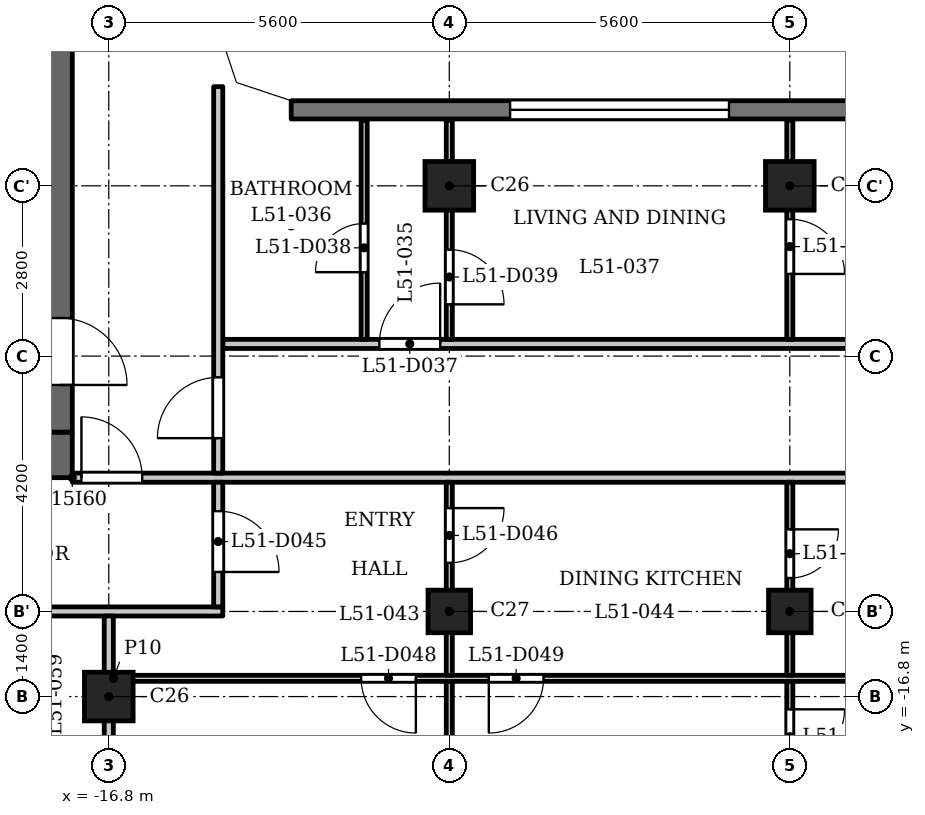
"""IFC4 building model, lengths in metres.
Left out: names, types, materials, properties, quantities, classifications, styles, units other than length and angle.
Written with IfcOpenShell. Run it as: python <this file> out.ifc"""

import sys

from ifc_helpers import new_model, si_unit, direction, frame, frame_2d, origin, origin_2d, place, context, subcontext, project, spatial, polyline, rectangle, outline, extrude, element, fill, save


model = new_model("IFC4")
c1 = context("Model", 3, precision=1e-05, world=origin(), true_north=direction((0.0, 1.0)))
c2 = subcontext(c1, "Body", "Model", "MODEL_VIEW")
j1 = project(units=[si_unit("LENGTHUNIT", "METRE"), si_unit("PLANEANGLEUNIT", "RADIAN")], contexts=[c1])
p1 = place(None, origin())
s1 = spatial("IfcSite", under=j1, at=p1, CompositionType="ELEMENT")
p2 = place(p1, origin())
s2 = spatial("IfcBuilding", under=s1, at=p2, CompositionType="ELEMENT")
p3 = place(p2, frame((0.0, 0.0, 199.4)))
s3 = spatial("IfcBuildingStorey", under=s2, at=p3, CompositionType="ELEMENT", Elevation=199.4)
for number, where, z_axis, x_axis in (
    (1, (-16.8, -16.8, 0.0), (0.0, 0.0, 1.0), (1.0, 0.0, 0.0)),
    (2, (-11.2, -8.4, 0.0), (0.0, 0.0, 1.0), (1.0, 0.0, 0.0)),
    (3, (-5.6, -8.4, 0.0), (0.0, 0.0, 1.0), (1.0, 0.0, 0.0)),
):
    element("IfcColumn", number, at=place(p3, frame(where, z_axis=z_axis, x_axis=x_axis)), inside=s3, PredefinedType="COLUMN", context=c2, shape_type="SweptSolid", body=[
        extrude(rectangle(XDim=0.8, YDim=0.8, at=origin_2d()), origin(), (0.0, 0.0, 1.0), 3.5),
    ])
for number, where, z_axis, x_axis in (
    (4, (-11.2, -15.4, 0.0), (0.0, 0.0, 1.0), (1.0, 0.0, 0.0)),
    (5, (-5.6, -15.4, 0.0), (0.0, 0.0, 1.0), (1.0, 0.0, 0.0)),
):
    element("IfcColumn", number, at=place(p3, frame(where, z_axis=z_axis, x_axis=x_axis)), inside=s3, PredefinedType="COLUMN", context=c2, shape_type="SweptSolid", body=[
        extrude(rectangle(XDim=0.7, YDim=0.7, at=origin_2d()), origin(), (0.0, 0.0, 1.0), 3.5),
    ])
p4 = place(p3, frame((13.8, -7.15, 0.0), z_axis=(0.0, 0.0, 1.0), x_axis=(-1.0, 0.0, 0.0)))
e6 = element("IfcWall", 6, at=p4, inside=s3, PredefinedType="SOLIDWALL", context=c2, shape_type="SweptSolid", body=[
    extrude(rectangle(XDim=27.6, YDim=0.3, at=frame_2d((13.8, 0.0))), origin(), (0.0, 0.0, 1.0), 3.2),
])
p5 = place(p4, frame((3.6, 0.0, 1.2)))
e7 = element("IfcOpeningElement", 7, at=p5, cuts=e6, PredefinedType="OPENING", context=c2, shape_type="SweptSolid", body=[
    extrude(rectangle(XDim=3.6, YDim=0.95, at=frame_2d((1.8, 0.475))), frame((0.0, 0.16, 0.0), z_axis=(0.0, -1.0, 0.0), x_axis=(1.0, 0.0, 0.0)), (0.0, 0.0, 1.0), 0.32),
])
p6 = place(p4, frame((9.2, 0.0, 1.2)))
e8 = element("IfcOpeningElement", 8, at=p6, cuts=e6, PredefinedType="OPENING", context=c2, shape_type="SweptSolid", body=[
    extrude(rectangle(XDim=3.6, YDim=0.95, at=frame_2d((1.8, 0.475))), frame((0.0, 0.16, 0.0), z_axis=(0.0, -1.0, 0.0), x_axis=(1.0, 0.0, 0.0)), (0.0, 0.0, 1.0), 0.32),
])
p7 = place(p4, frame((14.8, 0.0, 1.2)))
e9 = element("IfcOpeningElement", 9, at=p7, cuts=e6, PredefinedType="OPENING", context=c2, shape_type="SweptSolid", body=[
    extrude(rectangle(XDim=3.6, YDim=0.95, at=frame_2d((1.8, 0.475))), frame((0.0, 0.16, 0.0), z_axis=(0.0, -1.0, 0.0), x_axis=(1.0, 0.0, 0.0)), (0.0, 0.0, 1.0), 0.32),
])
p8 = place(p4, frame((20.4, 0.0, 1.2)))
e10 = element("IfcOpeningElement", 10, at=p8, cuts=e6, PredefinedType="OPENING", context=c2, shape_type="SweptSolid", body=[
    extrude(rectangle(XDim=3.6, YDim=0.95, at=frame_2d((1.8, 0.475))), frame((0.0, 0.16, 0.0), z_axis=(0.0, -1.0, 0.0), x_axis=(1.0, 0.0, 0.0)), (0.0, 0.0, 1.0), 0.32),
])
p9 = place(p3, frame((-17.4, -12.825, 0.0), z_axis=(0.0, 0.0, 1.0), x_axis=(-1.0, 0.0, 0.0)))
e11 = element("IfcWall", 11, at=p9, inside=s3, PredefinedType="SHEAR", context=c2, shape_type="SweptSolid", body=[
    extrude(rectangle(XDim=7.6, YDim=0.75, at=frame_2d((3.8, 0.0))), origin(), (0.0, 0.0, 1.0), 3.2),
])
p10 = place(p3, frame((-17.6, -12.45, 0.0), z_axis=(0.0, 0.0, 1.0), x_axis=(0.0, 1.0, 0.0)))
e12 = element("IfcWall", 12, at=p10, inside=s3, PredefinedType="SHEAR", context=c2, shape_type="SweptSolid", body=[
    extrude(rectangle(XDim=24.9, YDim=0.4, at=frame_2d((12.45, 0.0))), origin(), (0.0, 0.0, 1.0), 3.2),
])
p11 = place(p10, frame((8.65, 0.0, 0.0)))
e13 = element("IfcOpeningElement", 13, at=p11, cuts=e12, PredefinedType="OPENING", context=c2, shape_type="SweptSolid", body=[
    extrude(rectangle(XDim=0.9, YDim=2.1, at=frame_2d((0.45, 1.05))), frame((0.0, 0.21, 0.0), z_axis=(0.0, -1.0, 0.0), x_axis=(1.0, 0.0, 0.0)), (0.0, 0.0, 1.0), 0.42),
])
p12 = place(p10, frame((15.6, 0.0, 0.0)))
e14 = element("IfcOpeningElement", 14, at=p12, cuts=e12, PredefinedType="OPENING", context=c2, shape_type="SweptSolid", body=[
    extrude(rectangle(XDim=1.1, YDim=2.1, at=frame_2d((0.55, 1.05))), frame((0.0, 0.21, 0.0), z_axis=(0.0, -1.0, 0.0), x_axis=(1.0, 0.0, 0.0)), (0.0, 0.0, 1.0), 0.42),
])
p13 = place(p10, frame((18.0, 0.0, 0.0)))
e15 = element("IfcOpeningElement", 15, at=p13, cuts=e12, PredefinedType="OPENING", context=c2, shape_type="SweptSolid", body=[
    extrude(rectangle(XDim=1.1, YDim=2.1, at=frame_2d((0.55, 1.05))), frame((0.0, 0.21, 0.0), z_axis=(0.0, -1.0, 0.0), x_axis=(1.0, 0.0, 0.0)), (0.0, 0.0, 1.0), 0.42),
])
p14 = place(p10, frame((23.025, 0.0, 0.0)))
e16 = element("IfcOpeningElement", 16, at=p14, cuts=e12, PredefinedType="OPENING", context=c2, shape_type="SweptSolid", body=[
    extrude(rectangle(XDim=1.1, YDim=2.1, at=frame_2d((0.55, 1.05))), frame((0.0, 0.21, 0.0), z_axis=(0.0, -1.0, 0.0), x_axis=(1.0, 0.0, 0.0)), (0.0, 0.0, 1.0), 0.42),
])
p15 = place(p10, frame((0.775, 0.0, 0.0)))
e17 = element("IfcOpeningElement", 17, at=p15, cuts=e12, PredefinedType="OPENING", context=c2, shape_type="SweptSolid", body=[
    extrude(rectangle(XDim=1.1, YDim=2.1, at=frame_2d((0.55, 1.05))), frame((0.0, 0.21, 0.0), z_axis=(0.0, -1.0, 0.0), x_axis=(1.0, 0.0, 0.0)), (0.0, 0.0, 1.0), 0.42),
])
p16 = place(p10, frame((12.925, 0.0, 0.0)))
e18 = element("IfcOpeningElement", 18, at=p16, cuts=e12, PredefinedType="OPENING", context=c2, shape_type="SweptSolid", body=[
    extrude(rectangle(XDim=1.8, YDim=2.1, at=frame_2d((0.9, 1.05))), frame((0.0, 0.21, 0.0), z_axis=(0.0, -1.0, 0.0), x_axis=(1.0, 0.0, 0.0)), (0.0, 0.0, 1.0), 0.42),
])
p17 = place(p3, frame((-16.725, -16.5, 0.0), z_axis=(0.0, 0.0, 1.0), x_axis=(1.0, 0.0, 0.0)))
e19 = element("IfcWall", 19, at=p17, inside=s3, PredefinedType="PARTITIONING", context=c2, shape_type="SweptSolid", body=[
    extrude(rectangle(XDim=33.45, YDim=0.1, at=frame_2d((16.725, 0.0))), origin(), (0.0, 0.0, 1.0), 3.2),
])
p18 = place(p17, frame((4.075, 0.0, 0.0)))
e20 = element("IfcOpeningElement", 20, at=p18, cuts=e19, PredefinedType="OPENING", context=c2, shape_type="SweptSolid", body=[
    extrude(rectangle(XDim=0.9, YDim=2.1, at=frame_2d((0.45, 1.05))), frame((0.0, 0.06, 0.0), z_axis=(0.0, -1.0, 0.0), x_axis=(1.0, 0.0, 0.0)), (0.0, 0.0, 1.0), 0.12),
])
p19 = place(p17, frame((6.175, 0.0, 0.0)))
e21 = element("IfcOpeningElement", 21, at=p19, cuts=e19, PredefinedType="OPENING", context=c2, shape_type="SweptSolid", body=[
    extrude(rectangle(XDim=0.9, YDim=2.1, at=frame_2d((0.45, 1.05))), frame((0.0, 0.06, 0.0), z_axis=(0.0, -1.0, 0.0), x_axis=(1.0, 0.0, 0.0)), (0.0, 0.0, 1.0), 0.12),
])
p20 = place(p17, frame((30.575, 0.0, 0.0)))
e22 = element("IfcOpeningElement", 22, at=p20, cuts=e19, PredefinedType="OPENING", context=c2, shape_type="SweptSolid", body=[
    extrude(rectangle(XDim=0.9, YDim=2.1, at=frame_2d((0.45, 1.05))), frame((0.0, 0.06, 0.0), z_axis=(0.0, -1.0, 0.0), x_axis=(1.0, 0.0, 0.0)), (0.0, 0.0, 1.0), 0.12),
])
p21 = place(p17, frame((22.975, 0.0, 0.0)))
e23 = element("IfcOpeningElement", 23, at=p21, cuts=e19, PredefinedType="OPENING", context=c2, shape_type="SweptSolid", body=[
    extrude(rectangle(XDim=0.9, YDim=2.1, at=frame_2d((0.45, 1.05))), frame((0.0, 0.06, 0.0), z_axis=(0.0, -1.0, 0.0), x_axis=(1.0, 0.0, 0.0)), (0.0, 0.0, 1.0), 0.12),
])
p22 = place(p3, frame((-24.684, -15.4, 0.0), z_axis=(0.0, 0.0, 1.0), x_axis=(1.0, 0.0, 0.0)))
e24 = element("IfcWall", 24, at=p22, inside=s3, PredefinedType="PARTITIONING", context=c2, shape_type="SweptSolid", body=[
    extrude(rectangle(XDim=9.759, YDim=0.15, at=frame_2d((4.879, 0.0))), origin(), (0.0, 0.0, 1.0), 3.2),
])
p23 = place(p22, frame((3.643, 0.0, 0.0)))
e25 = element("IfcOpeningElement", 25, at=p23, cuts=e24, PredefinedType="OPENING", context=c2, shape_type="SweptSolid", body=[
    extrude(rectangle(XDim=1.0, YDim=2.1, at=frame_2d((0.5, 1.05))), frame((0.0, 0.085, 0.0), z_axis=(0.0, -1.0, 0.0), x_axis=(1.0, 0.0, 0.0)), (0.0, 0.0, 1.0), 0.17),
])
p24 = place(p3, frame((-17.4, -13.2, 0.0), z_axis=(0.0, 0.0, 1.0), x_axis=(1.0, 0.0, 0.0)))
e26 = element("IfcWall", 26, at=p24, inside=s3, PredefinedType="PARTITIONING", context=c2, shape_type="SweptSolid", body=[
    extrude(rectangle(XDim=34.8, YDim=0.15, at=frame_2d((17.4, 0.0))), origin(), (0.0, 0.0, 1.0), 3.2),
])
p25 = place(p24, frame((0.15, 0.0, 0.0)))
e27 = element("IfcOpeningElement", 27, at=p25, cuts=e26, PredefinedType="OPENING", context=c2, shape_type="SweptSolid", body=[
    extrude(rectangle(XDim=1.0, YDim=2.1, at=frame_2d((0.5, 1.05))), frame((0.0, 0.085, 0.0), z_axis=(0.0, -1.0, 0.0), x_axis=(1.0, 0.0, 0.0)), (0.0, 0.0, 1.0), 0.17),
])
p26 = place(p24, frame((33.55, 0.0, 0.0)))
e28 = element("IfcOpeningElement", 28, at=p26, cuts=e26, PredefinedType="OPENING", context=c2, shape_type="SweptSolid", body=[
    extrude(rectangle(XDim=1.0, YDim=2.1, at=frame_2d((0.5, 1.05))), frame((0.0, 0.085, 0.0), z_axis=(0.0, -1.0, 0.0), x_axis=(1.0, 0.0, 0.0)), (0.0, 0.0, 1.0), 0.17),
])
p27 = place(p3, frame((-14.925, -11.0, 0.0), z_axis=(0.0, 0.0, 1.0), x_axis=(1.0, 0.0, 0.0)))
e29 = element("IfcWall", 29, at=p27, inside=s3, PredefinedType="PARTITIONING", context=c2, shape_type="SweptSolid", body=[
    extrude(rectangle(XDim=29.85, YDim=0.15, at=frame_2d((14.925, 0.0))), origin(), (0.0, 0.0, 1.0), 3.2),
])
p28 = place(p27, frame((2.575, 0.0, 0.0)))
e30 = element("IfcOpeningElement", 30, at=p28, cuts=e29, PredefinedType="OPENING", context=c2, shape_type="SweptSolid", body=[
    extrude(rectangle(XDim=1.0, YDim=2.1, at=frame_2d((0.5, 1.05))), frame((0.0, 0.085, 0.0), z_axis=(0.0, -1.0, 0.0), x_axis=(1.0, 0.0, 0.0)), (0.0, 0.0, 1.0), 0.17),
])
p29 = place(p27, frame((26.375, 0.0, 0.0)))
e31 = element("IfcOpeningElement", 31, at=p29, cuts=e29, PredefinedType="OPENING", context=c2, shape_type="SweptSolid", body=[
    extrude(rectangle(XDim=1.0, YDim=2.1, at=frame_2d((0.5, 1.05))), frame((0.0, 0.085, 0.0), z_axis=(0.0, -1.0, 0.0), x_axis=(1.0, 0.0, 0.0)), (0.0, 0.0, 1.0), 0.17),
])
p30 = place(p3, frame((-16.8, -22.31, 0.0), z_axis=(0.0, 0.0, 1.0), x_axis=(0.0, 1.0, 0.0)))
e32 = element("IfcWall", 32, at=p30, inside=s3, PredefinedType="PARTITIONING", context=c2, shape_type="SweptSolid", body=[
    extrude(rectangle(XDim=6.835, YDim=0.15, at=frame_2d((3.417, 0.0))), origin(), (0.0, 0.0, 1.0), 2.55),
])
p31 = place(p3, frame((-15.0, -15.325, 0.0), z_axis=(0.0, 0.0, 1.0), x_axis=(0.0, 1.0, 0.0)))
e33 = element("IfcWall", 33, at=p31, inside=s3, PredefinedType="PARTITIONING", context=c2, shape_type="SweptSolid", body=[
    extrude(rectangle(XDim=2.05, YDim=0.15, at=frame_2d((1.025, 0.0))), origin(), (0.0, 0.0, 1.0), 3.2),
])
p32 = place(p31, frame((0.574, 0.0, 0.0)))
e34 = element("IfcOpeningElement", 34, at=p32, cuts=e33, PredefinedType="OPENING", context=c2, shape_type="SweptSolid", body=[
    extrude(rectangle(XDim=1.0, YDim=2.1, at=frame_2d((0.5, 1.05))), frame((0.0, 0.085, 0.0), z_axis=(0.0, -1.0, 0.0), x_axis=(1.0, 0.0, 0.0)), (0.0, 0.0, 1.0), 0.17),
])
p33 = place(p3, frame((-15.0, -13.125, 0.0), z_axis=(0.0, 0.0, 1.0), x_axis=(0.0, 1.0, 0.0)))
e35 = element("IfcWall", 35, at=p33, inside=s3, PredefinedType="PARTITIONING", context=c2, shape_type="SweptSolid", body=[
    extrude(rectangle(XDim=6.356, YDim=0.15, at=frame_2d((3.178, 0.0))), origin(), (0.0, 0.0, 1.0), 3.2),
])
p34 = place(p33, frame((0.575, 0.0, 0.0)))
e36 = element("IfcOpeningElement", 36, at=p34, cuts=e35, PredefinedType="OPENING", context=c2, shape_type="SweptSolid", body=[
    extrude(rectangle(XDim=1.0, YDim=2.1, at=frame_2d((0.5, 1.05))), frame((0.0, 0.085, 0.0), z_axis=(0.0, -1.0, 0.0), x_axis=(1.0, 0.0, 0.0)), (0.0, 0.0, 1.0), 0.17),
])
p35 = place(p3, frame((-12.6, -10.925, 0.0), z_axis=(0.0, 0.0, 1.0), x_axis=(0.0, 1.0, 0.0)))
e37 = element("IfcWall", 37, at=p35, inside=s3, PredefinedType="PARTITIONING", context=c2, shape_type="SweptSolid", body=[
    extrude(rectangle(XDim=3.605, YDim=0.1, at=frame_2d((1.802, 0.0))), origin(), (0.0, 0.0, 1.0), 3.2),
])
p36 = place(p35, frame((1.105, 0.0, 0.0)))
e38 = element("IfcOpeningElement", 38, at=p36, cuts=e37, PredefinedType="OPENING", context=c2, shape_type="SweptSolid", body=[
    extrude(rectangle(XDim=0.8, YDim=2.1, at=frame_2d((0.4, 1.05))), frame((0.0, 0.06, 0.0), z_axis=(0.0, -1.0, 0.0), x_axis=(1.0, 0.0, 0.0)), (0.0, 0.0, 1.0), 0.12),
])
p37 = place(p3, frame((-11.2, -22.08, 0.0), z_axis=(0.0, 0.0, 1.0), x_axis=(0.0, 1.0, 0.0)))
e39 = element("IfcWall", 39, at=p37, inside=s3, PredefinedType="PARTITIONING", context=c2, shape_type="SweptSolid", body=[
    extrude(rectangle(XDim=5.53, YDim=0.1, at=frame_2d((2.765, 0.0))), origin(), (0.0, 0.0, 1.0), 3.2),
])
p38 = place(p3, frame((-11.2, -16.45, 0.0), z_axis=(0.0, 0.0, 1.0), x_axis=(0.0, 1.0, 0.0)))
e40 = element("IfcWall", 40, at=p38, inside=s3, PredefinedType="PARTITIONING", context=c2, shape_type="SweptSolid", body=[
    extrude(rectangle(XDim=3.175, YDim=0.1, at=frame_2d((1.587, 0.0))), origin(), (0.0, 0.0, 1.0), 3.2),
])
p39 = place(p38, frame((1.85, 0.0, 0.0)))
e41 = element("IfcOpeningElement", 41, at=p39, cuts=e40, PredefinedType="OPENING", context=c2, shape_type="SweptSolid", body=[
    extrude(rectangle(XDim=0.9, YDim=2.1, at=frame_2d((0.45, 1.05))), frame((0.0, 0.06, 0.0), z_axis=(0.0, -1.0, 0.0), x_axis=(1.0, 0.0, 0.0)), (0.0, 0.0, 1.0), 0.12),
])
p40 = place(p3, frame((-11.2, -10.925, 0.0), z_axis=(0.0, 0.0, 1.0), x_axis=(0.0, 1.0, 0.0)))
e42 = element("IfcWall", 42, at=p40, inside=s3, PredefinedType="PARTITIONING", context=c2, shape_type="SweptSolid", body=[
    extrude(rectangle(XDim=3.605, YDim=0.1, at=frame_2d((1.802, 0.0))), origin(), (0.0, 0.0, 1.0), 3.2),
])
p41 = place(p40, frame((0.576, 0.0, 0.0)))
e43 = element("IfcOpeningElement", 43, at=p41, cuts=e42, PredefinedType="OPENING", context=c2, shape_type="SweptSolid", body=[
    extrude(rectangle(XDim=0.9, YDim=2.1, at=frame_2d((0.45, 1.05))), frame((0.0, 0.06, 0.0), z_axis=(0.0, -1.0, 0.0), x_axis=(1.0, 0.0, 0.0)), (0.0, 0.0, 1.0), 0.12),
])
p42 = place(p3, frame((-5.6, -22.08, 0.0), z_axis=(0.0, 0.0, 1.0), x_axis=(0.0, 1.0, 0.0)))
e44 = element("IfcWall", 44, at=p42, inside=s3, PredefinedType="PARTITIONING", context=c2, shape_type="SweptSolid", body=[
    extrude(rectangle(XDim=5.53, YDim=0.1, at=frame_2d((2.765, 0.0))), origin(), (0.0, 0.0, 1.0), 3.2),
])
p43 = place(p42, frame((4.17, 0.0, 0.0)))
e45 = element("IfcOpeningElement", 45, at=p43, cuts=e44, PredefinedType="OPENING", context=c2, shape_type="SweptSolid", body=[
    extrude(rectangle(XDim=0.9, YDim=2.1, at=frame_2d((0.45, 1.05))), frame((0.0, 0.06, 0.0), z_axis=(0.0, -1.0, 0.0), x_axis=(1.0, 0.0, 0.0)), (0.0, 0.0, 1.0), 0.12),
])
p44 = place(p3, frame((-5.6, -16.45, 0.0), z_axis=(0.0, 0.0, 1.0), x_axis=(0.0, 1.0, 0.0)))
e46 = element("IfcWall", 46, at=p44, inside=s3, PredefinedType="PARTITIONING", context=c2, shape_type="SweptSolid", body=[
    extrude(rectangle(XDim=3.175, YDim=0.1, at=frame_2d((1.587, 0.0))), origin(), (0.0, 0.0, 1.0), 3.2),
])
p45 = place(p44, frame((1.6, 0.0, 0.0)))
e47 = element("IfcOpeningElement", 47, at=p45, cuts=e46, PredefinedType="OPENING", context=c2, shape_type="SweptSolid", body=[
    extrude(rectangle(XDim=0.8, YDim=2.1, at=frame_2d((0.4, 1.05))), frame((0.0, 0.06, 0.0), z_axis=(0.0, -1.0, 0.0), x_axis=(1.0, 0.0, 0.0)), (0.0, 0.0, 1.0), 0.12),
])
p46 = place(p3, frame((-5.6, -10.925, 0.0), z_axis=(0.0, 0.0, 1.0), x_axis=(0.0, 1.0, 0.0)))
e48 = element("IfcWall", 48, at=p46, inside=s3, PredefinedType="PARTITIONING", context=c2, shape_type="SweptSolid", body=[
    extrude(rectangle(XDim=3.605, YDim=0.1, at=frame_2d((1.802, 0.0))), origin(), (0.0, 0.0, 1.0), 3.2),
])
p47 = place(p46, frame((1.076, 0.0, 0.0)))
e49 = element("IfcOpeningElement", 49, at=p47, cuts=e48, PredefinedType="OPENING", context=c2, shape_type="SweptSolid", body=[
    extrude(rectangle(XDim=0.9, YDim=2.1, at=frame_2d((0.45, 1.05))), frame((0.0, 0.06, 0.0), z_axis=(0.0, -1.0, 0.0), x_axis=(1.0, 0.0, 0.0)), (0.0, 0.0, 1.0), 0.12),
])
p48 = place(p3, origin())
e50 = element("IfcWall", 50, at=p48, inside=s3, PredefinedType="SOLIDWALL", context=c2, shape_type="SweptSolid", body=[
    extrude(outline(polyline([(-14.937, -6.937), (-13.849, -7.3), (-13.8, -7.3), (-13.8, -7.0), (-14.7, -6.7), (-15.0, -5.8), (-15.3, -5.8), (-15.3, -5.849), (-14.937, -6.937)])), origin(), (0.0, 0.0, 1.0), 3.2),
])
p49 = place(p15, origin())
e51 = element("IfcDoor", 51, at=p49, inside=s3, OperationType="SINGLE_SWING_LEFT", PredefinedType="DOOR", context=c2, shape_type="SweptSolid", body=[
    extrude(rectangle(XDim=1.1, YDim=2.1, at=frame_2d((0.55, 1.05))), frame((0.0, 0.025, 0.0), z_axis=(0.0, -1.0, 0.0), x_axis=(1.0, 0.0, 0.0)), (0.0, 0.0, 1.0), 0.05),
])
fill(e17, e51)
p50 = place(p34, origin())
e52 = element("IfcDoor", 52, at=p50, inside=s3, OperationType="SINGLE_SWING_RIGHT", PredefinedType="DOOR", context=c2, shape_type="SweptSolid", body=[
    extrude(rectangle(XDim=1.0, YDim=2.1, at=frame_2d((0.5, 1.05))), frame((0.0, 0.025, 0.0), z_axis=(0.0, -1.0, 0.0), x_axis=(1.0, 0.0, 0.0)), (0.0, 0.0, 1.0), 0.05),
])
fill(e36, e52)
p51 = place(p25, origin())
e53 = element("IfcDoor", 53, at=p51, inside=s3, OperationType="SINGLE_SWING_RIGHT", PredefinedType="DOOR", context=c2, shape_type="SweptSolid", body=[
    extrude(rectangle(XDim=1.0, YDim=2.1, at=frame_2d((0.5, 1.05))), frame((0.0, 0.025, 0.0), z_axis=(0.0, -1.0, 0.0), x_axis=(1.0, 0.0, 0.0)), (0.0, 0.0, 1.0), 0.05),
])
fill(e27, e53)
p52 = place(p28, origin())
e54 = element("IfcDoor", 54, at=p52, inside=s3, OperationType="SINGLE_SWING_LEFT", PredefinedType="DOOR", context=c2, shape_type="SweptSolid", body=[
    extrude(rectangle(XDim=1.0, YDim=2.1, at=frame_2d((0.5, 1.05))), frame((0.0, 0.025, 0.0), z_axis=(0.0, -1.0, 0.0), x_axis=(1.0, 0.0, 0.0)), (0.0, 0.0, 1.0), 0.05),
])
fill(e30, e54)
p53 = place(p36, origin())
e55 = element("IfcDoor", 55, at=p53, inside=s3, OperationType="SINGLE_SWING_RIGHT", PredefinedType="DOOR", context=c2, shape_type="SweptSolid", body=[
    extrude(rectangle(XDim=0.8, YDim=2.1, at=frame_2d((0.4, 1.05))), frame((0.0, 0.025, 0.0), z_axis=(0.0, -1.0, 0.0), x_axis=(1.0, 0.0, 0.0)), (0.0, 0.0, 1.0), 0.05),
])
fill(e38, e55)
p54 = place(p41, origin())
e56 = element("IfcDoor", 56, at=p54, inside=s3, OperationType="SINGLE_SWING_LEFT", PredefinedType="DOOR", context=c2, shape_type="SweptSolid", body=[
    extrude(rectangle(XDim=0.9, YDim=2.1, at=frame_2d((0.45, 1.05))), frame((0.0, 0.025, 0.0), z_axis=(0.0, -1.0, 0.0), x_axis=(1.0, 0.0, 0.0)), (0.0, 0.0, 1.0), 0.05),
])
fill(e43, e56)
p55 = place(p47, origin())
e57 = element("IfcDoor", 57, at=p55, inside=s3, OperationType="SINGLE_SWING_LEFT", PredefinedType="DOOR", context=c2, shape_type="SweptSolid", body=[
    extrude(rectangle(XDim=0.9, YDim=2.1, at=frame_2d((0.45, 1.05))), frame((0.0, 0.025, 0.0), z_axis=(0.0, -1.0, 0.0), x_axis=(1.0, 0.0, 0.0)), (0.0, 0.0, 1.0), 0.05),
])
fill(e49, e57)
p56 = place(p32, origin())
e58 = element("IfcDoor", 58, at=p56, inside=s3, OperationType="SINGLE_SWING_LEFT", PredefinedType="DOOR", context=c2, shape_type="SweptSolid", body=[
    extrude(rectangle(XDim=1.0, YDim=2.1, at=frame_2d((0.5, 1.05))), frame((0.0, 0.025, 0.0), z_axis=(0.0, -1.0, 0.0), x_axis=(1.0, 0.0, 0.0)), (0.0, 0.0, 1.0), 0.05),
])
fill(e34, e58)
p57 = place(p39, origin())
e59 = element("IfcDoor", 59, at=p57, inside=s3, OperationType="SINGLE_SWING_RIGHT", PredefinedType="DOOR", context=c2, shape_type="SweptSolid", body=[
    extrude(rectangle(XDim=0.9, YDim=2.1, at=frame_2d((0.45, 1.05))), frame((0.0, 0.025, 0.0), z_axis=(0.0, -1.0, 0.0), x_axis=(1.0, 0.0, 0.0)), (0.0, 0.0, 1.0), 0.05),
])
fill(e41, e59)
p58 = place(p45, origin())
e60 = element("IfcDoor", 60, at=p58, inside=s3, OperationType="SINGLE_SWING_RIGHT", PredefinedType="DOOR", context=c2, shape_type="SweptSolid", body=[
    extrude(rectangle(XDim=0.8, YDim=2.1, at=frame_2d((0.4, 1.05))), frame((0.0, 0.025, 0.0), z_axis=(0.0, -1.0, 0.0), x_axis=(1.0, 0.0, 0.0)), (0.0, 0.0, 1.0), 0.05),
])
fill(e47, e60)
p59 = place(p18, origin())
e61 = element("IfcDoor", 61, at=p59, inside=s3, OperationType="SINGLE_SWING_RIGHT", PredefinedType="DOOR", context=c2, shape_type="SweptSolid", body=[
    extrude(rectangle(XDim=0.9, YDim=2.1, at=frame_2d((0.45, 1.05))), frame((0.0, 0.025, 0.0), z_axis=(0.0, -1.0, 0.0), x_axis=(1.0, 0.0, 0.0)), (0.0, 0.0, 1.0), 0.05),
])
fill(e20, e61)
p60 = place(p19, origin())
e62 = element("IfcDoor", 62, at=p60, inside=s3, OperationType="SINGLE_SWING_LEFT", PredefinedType="DOOR", context=c2, shape_type="SweptSolid", body=[
    extrude(rectangle(XDim=0.9, YDim=2.1, at=frame_2d((0.45, 1.05))), frame((0.0, 0.025, 0.0), z_axis=(0.0, -1.0, 0.0), x_axis=(1.0, 0.0, 0.0)), (0.0, 0.0, 1.0), 0.05),
])
fill(e21, e62)
p61 = place(p43, origin())
e63 = element("IfcDoor", 63, at=p61, inside=s3, OperationType="SINGLE_SWING_RIGHT", PredefinedType="DOOR", context=c2, shape_type="SweptSolid", body=[
    extrude(rectangle(XDim=0.9, YDim=2.1, at=frame_2d((0.45, 1.05))), frame((0.0, 0.025, 0.0), z_axis=(0.0, -1.0, 0.0), x_axis=(1.0, 0.0, 0.0)), (0.0, 0.0, 1.0), 0.05),
])
fill(e45, e63)
p62 = place(p8, origin())
e64 = element("IfcWindow", 64, at=p62, inside=s3, PartitioningType="SINGLE_PANEL", PredefinedType="WINDOW", context=c2, shape_type="SweptSolid", body=[
    extrude(rectangle(XDim=3.6, YDim=0.95, at=frame_2d((1.8, 0.475))), frame((0.0, 0.03, 0.0), z_axis=(0.0, -1.0, 0.0), x_axis=(1.0, 0.0, 0.0)), (0.0, 0.0, 1.0), 0.06),
])
fill(e10, e64)
save(model, sys.argv[1])
